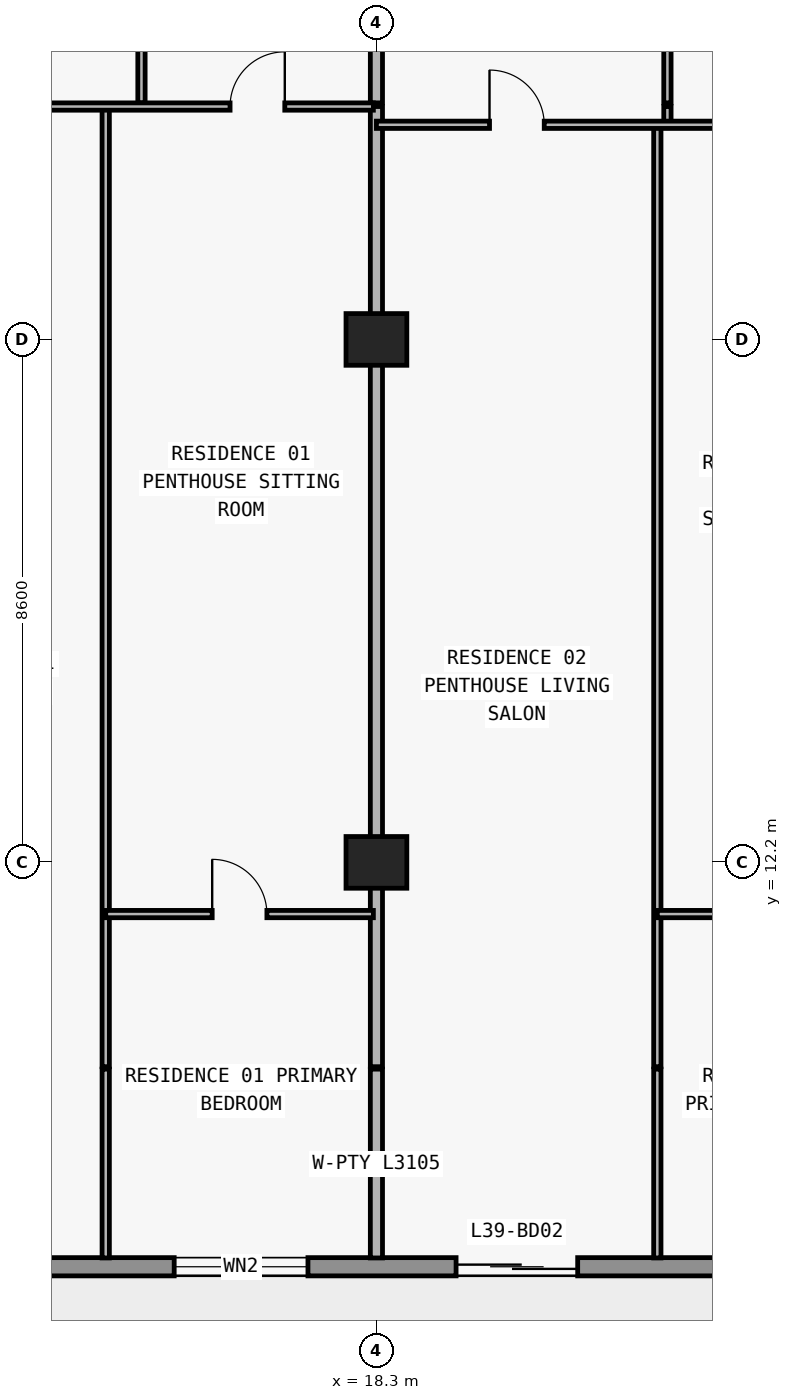
"""IFC4 building model, lengths in metres.
Left out: names, types, materials, properties, quantities, classifications, styles, units other than length and angle.
Written with IfcOpenShell. Run it as: python <this file> out.ifc"""

import sys

from ifc_helpers import new_model, si_unit, direction, frame, frame_2d, origin, origin_2d, place, context, subcontext, project, spatial, rectangle, extrude, element, fill, save


model = new_model("IFC4")
c1 = context("Model", 3, precision=1e-05, world=origin(), true_north=direction((0.0, 1.0)))
c2 = subcontext(c1, "Body", "Model", "MODEL_VIEW")
j1 = project(units=[si_unit("LENGTHUNIT", "METRE"), si_unit("PLANEANGLEUNIT", "RADIAN")], contexts=[c1])
p1 = place(None, origin())
s1 = spatial("IfcSite", under=j1, at=p1, CompositionType="ELEMENT")
p2 = place(p1, origin())
s2 = spatial("IfcBuilding", under=s1, at=p2, CompositionType="ELEMENT")
p3 = place(p2, frame((0.0, 0.0, 142.2)))
s3 = spatial("IfcBuildingStorey", under=s2, at=p3, CompositionType="ELEMENT", Elevation=142.2)
for number, where, z_axis, x_axis in (
    (1, (18.3, 12.2, 0.0), (0.0, 0.0, 1.0), (1.0, 0.0, 0.0)),
    (2, (18.3, 20.8, 0.0), (0.0, 0.0, 1.0), (1.0, 0.0, 0.0)),
):
    element("IfcColumn", number, at=place(p3, frame(where, z_axis=z_axis, x_axis=x_axis)), inside=s3, PredefinedType="COLUMN", context=c2, shape_type="SweptSolid", body=[
        extrude(rectangle(XDim=1.0, YDim=0.85, at=origin_2d()), origin(), (0.0, 0.0, 1.0), 3.05),
    ])
p4 = place(p3, frame((70.1, 5.55, 0.0), z_axis=(0.0, 0.0, 1.0), x_axis=(-1.0, 0.0, 0.0)))
e3 = element("IfcWall", 3, at=p4, inside=s3, PredefinedType="STANDARD", context=c2, shape_type="SweptSolid", body=[
    extrude(rectangle(XDim=62.4, YDim=0.3, at=frame_2d((31.2, 0.0))), origin(), (0.0, 0.0, 1.0), 3.05),
])
p5 = place(p4, frame((57.226, 0.0, 0.0)))
e4 = element("IfcOpeningElement", 4, at=p5, cuts=e3, PredefinedType="OPENING", context=c2, shape_type="SweptSolid", body=[
    extrude(rectangle(XDim=2.0, YDim=2.3, at=frame_2d((1.0, 1.15))), frame((0.0, 0.16, 0.0), z_axis=(0.0, -1.0, 0.0), x_axis=(1.0, 0.0, 0.0)), (0.0, 0.0, 1.0), 0.32),
])
p6 = place(p4, frame((52.926, 0.0, 0.85)))
e5 = element("IfcOpeningElement", 5, at=p6, cuts=e3, PredefinedType="OPENING", context=c2, shape_type="SweptSolid", body=[
    extrude(rectangle(XDim=2.2, YDim=1.55, at=frame_2d((1.1, 0.775))), frame((0.0, 0.16, 0.0), z_axis=(0.0, -1.0, 0.0), x_axis=(1.0, 0.0, 0.0)), (0.0, 0.0, 1.0), 0.32),
])
p7 = place(p4, frame((48.49, 0.0, 0.0)))
e6 = element("IfcOpeningElement", 6, at=p7, cuts=e3, PredefinedType="OPENING", context=c2, shape_type="SweptSolid", body=[
    extrude(rectangle(XDim=2.0, YDim=2.3, at=frame_2d((1.0, 1.15))), frame((0.0, 0.16, 0.0), z_axis=(0.0, -1.0, 0.0), x_axis=(1.0, 0.0, 0.0)), (0.0, 0.0, 1.0), 0.32),
])
p8 = place(p4, frame((44.39, 0.0, 0.85)))
e7 = element("IfcOpeningElement", 7, at=p8, cuts=e3, PredefinedType="OPENING", context=c2, shape_type="SweptSolid", body=[
    extrude(rectangle(XDim=1.8, YDim=1.55, at=frame_2d((0.9, 0.775))), frame((0.0, 0.16, 0.0), z_axis=(0.0, -1.0, 0.0), x_axis=(1.0, 0.0, 0.0)), (0.0, 0.0, 1.0), 0.32),
])
p9 = place(p4, frame((40.426, 0.0, 0.0)))
e8 = element("IfcOpeningElement", 8, at=p9, cuts=e3, PredefinedType="OPENING", context=c2, shape_type="SweptSolid", body=[
    extrude(rectangle(XDim=2.0, YDim=2.3, at=frame_2d((1.0, 1.15))), frame((0.0, 0.16, 0.0), z_axis=(0.0, -1.0, 0.0), x_axis=(1.0, 0.0, 0.0)), (0.0, 0.0, 1.0), 0.32),
])
p10 = place(p4, frame((36.126, 0.0, 0.85)))
e9 = element("IfcOpeningElement", 9, at=p10, cuts=e3, PredefinedType="OPENING", context=c2, shape_type="SweptSolid", body=[
    extrude(rectangle(XDim=2.2, YDim=1.55, at=frame_2d((1.1, 0.775))), frame((0.0, 0.16, 0.0), z_axis=(0.0, -1.0, 0.0), x_axis=(1.0, 0.0, 0.0)), (0.0, 0.0, 1.0), 0.32),
])
p11 = place(p4, frame((32.09, 0.0, 0.0)))
e10 = element("IfcOpeningElement", 10, at=p11, cuts=e3, PredefinedType="OPENING", context=c2, shape_type="SweptSolid", body=[
    extrude(rectangle(XDim=2.0, YDim=2.3, at=frame_2d((1.0, 1.15))), frame((0.0, 0.16, 0.0), z_axis=(0.0, -1.0, 0.0), x_axis=(1.0, 0.0, 0.0)), (0.0, 0.0, 1.0), 0.32),
])
p12 = place(p4, frame((28.21, 0.0, 0.65)))
e11 = element("IfcOpeningElement", 11, at=p12, cuts=e3, PredefinedType="OPENING", context=c2, shape_type="SweptSolid", body=[
    extrude(rectangle(XDim=2.6, YDim=1.85, at=frame_2d((1.3, 0.925))), frame((0.0, 0.16, 0.0), z_axis=(0.0, -1.0, 0.0), x_axis=(1.0, 0.0, 0.0)), (0.0, 0.0, 1.0), 0.32),
])
p13 = place(p4, frame((22.1, 0.0, 0.85)))
e12 = element("IfcOpeningElement", 12, at=p13, cuts=e3, PredefinedType="OPENING", context=c2, shape_type="SweptSolid", body=[
    extrude(rectangle(XDim=2.2, YDim=1.55, at=frame_2d((1.1, 0.775))), frame((0.0, 0.16, 0.0), z_axis=(0.0, -1.0, 0.0), x_axis=(1.0, 0.0, 0.0)), (0.0, 0.0, 1.0), 0.32),
])
p14 = place(p4, frame((16.09, 0.0, 0.0)))
e13 = element("IfcOpeningElement", 13, at=p14, cuts=e3, PredefinedType="OPENING", context=c2, shape_type="SweptSolid", body=[
    extrude(rectangle(XDim=2.0, YDim=2.3, at=frame_2d((1.0, 1.15))), frame((0.0, 0.16, 0.0), z_axis=(0.0, -1.0, 0.0), x_axis=(1.0, 0.0, 0.0)), (0.0, 0.0, 1.0), 0.32),
])
p15 = place(p4, frame((11.41, 0.0, 0.65)))
e14 = element("IfcOpeningElement", 14, at=p15, cuts=e3, PredefinedType="OPENING", context=c2, shape_type="SweptSolid", body=[
    extrude(rectangle(XDim=2.6, YDim=1.85, at=frame_2d((1.3, 0.925))), frame((0.0, 0.16, 0.0), z_axis=(0.0, -1.0, 0.0), x_axis=(1.0, 0.0, 0.0)), (0.0, 0.0, 1.0), 0.32),
])
p16 = place(p4, frame((5.3, 0.0, 0.85)))
e15 = element("IfcOpeningElement", 15, at=p16, cuts=e3, PredefinedType="OPENING", context=c2, shape_type="SweptSolid", body=[
    extrude(rectangle(XDim=2.2, YDim=1.55, at=frame_2d((1.1, 0.775))), frame((0.0, 0.16, 0.0), z_axis=(0.0, -1.0, 0.0), x_axis=(1.0, 0.0, 0.0)), (0.0, 0.0, 1.0), 0.32),
])
p17 = place(p3, frame((13.848, 5.695, 0.0), z_axis=(0.0, 0.0, 1.0), x_axis=(0.0, 1.0, 0.0)))
e16 = element("IfcWall", 16, at=p17, inside=s3, PredefinedType="PARTITIONING", context=c2, shape_type="SweptSolid", body=[
    extrude(rectangle(XDim=3.105, YDim=0.12, at=frame_2d((1.552, 0.0))), origin(), (0.0, 0.0, 1.0), 3.05),
])
p18 = place(p3, frame((13.848, 8.84, 0.0), z_axis=(0.0, 0.0, 1.0), x_axis=(0.0, 1.0, 0.0)))
e17 = element("IfcWall", 17, at=p18, inside=s3, PredefinedType="PARTITIONING", context=c2, shape_type="SweptSolid", body=[
    extrude(rectangle(XDim=15.79, YDim=0.12, at=frame_2d((7.895, 0.0))), origin(), (0.0, 0.0, 1.0), 3.05),
])
p19 = place(p3, frame((14.436, 24.69, 0.0), z_axis=(0.0, 0.0, 1.0), x_axis=(0.0, 1.0, 0.0)))
e18 = element("IfcWall", 18, at=p19, inside=s3, PredefinedType="PARTITIONING", context=c2, shape_type="SweptSolid", body=[
    extrude(rectangle(XDim=5.09, YDim=0.12, at=frame_2d((2.545, 0.0))), origin(), (0.0, 0.0, 1.0), 3.05),
])
p20 = place(p19, frame((2.095, 0.0, 0.0)))
e19 = element("IfcOpeningElement", 19, at=p20, cuts=e18, PredefinedType="OPENING", context=c2, shape_type="SweptSolid", body=[
    extrude(rectangle(XDim=0.9, YDim=2.15, at=frame_2d((0.45, 1.075))), frame((0.0, 0.07, 0.0), z_axis=(0.0, -1.0, 0.0), x_axis=(1.0, 0.0, 0.0)), (0.0, 0.0, 1.0), 0.14),
])
p21 = place(p3, frame((18.3, 5.695, 0.0), z_axis=(0.0, 0.0, 1.0), x_axis=(0.0, 1.0, 0.0)))
e20 = element("IfcWall", 20, at=p21, inside=s3, PredefinedType="PARTITIONING", context=c2, shape_type="SweptSolid", body=[
    extrude(rectangle(XDim=3.105, YDim=0.2, at=frame_2d((1.552, 0.0))), origin(), (0.0, 0.0, 1.0), 3.05),
])
p22 = place(p3, frame((18.3, 8.84, 0.0), z_axis=(0.0, 0.0, 1.0), x_axis=(0.0, 1.0, 0.0)))
e21 = element("IfcWall", 21, at=p22, inside=s3, PredefinedType="PARTITIONING", context=c2, shape_type="SweptSolid", body=[
    extrude(rectangle(XDim=15.79, YDim=0.2, at=frame_2d((7.895, 0.0))), origin(), (0.0, 0.0, 1.0), 2.174),
])
p23 = place(p3, frame((18.3, 24.69, 0.0), z_axis=(0.0, 0.0, 1.0), x_axis=(0.0, 1.0, 0.0)))
e22 = element("IfcWall", 22, at=p23, inside=s3, PredefinedType="PARTITIONING", context=c2, shape_type="SweptSolid", body=[
    extrude(rectangle(XDim=5.09, YDim=0.2, at=frame_2d((2.545, 0.0))), origin(), (0.0, 0.0, 1.0), 2.174),
])
p24 = place(p3, frame((22.92, 5.695, 0.0), z_axis=(0.0, 0.0, 1.0), x_axis=(0.0, 1.0, 0.0)))
e23 = element("IfcWall", 23, at=p24, inside=s3, PredefinedType="PARTITIONING", context=c2, shape_type="SweptSolid", body=[
    extrude(rectangle(XDim=3.105, YDim=0.12, at=frame_2d((1.552, 0.0))), origin(), (0.0, 0.0, 1.0), 3.05),
])
p25 = place(p3, frame((22.92, 8.84, 0.0), z_axis=(0.0, 0.0, 1.0), x_axis=(0.0, 1.0, 0.0)))
e24 = element("IfcWall", 24, at=p25, inside=s3, PredefinedType="PARTITIONING", context=c2, shape_type="SweptSolid", body=[
    extrude(rectangle(XDim=15.49, YDim=0.12, at=frame_2d((7.745, 0.0))), origin(), (0.0, 0.0, 1.0), 3.05),
])
p26 = place(p3, frame((23.086, 24.335, 0.0), z_axis=(0.0, 0.0, 1.0), x_axis=(0.0, 1.0, 0.0)))
e25 = element("IfcWall", 25, at=p26, inside=s3, PredefinedType="PARTITIONING", context=c2, shape_type="SweptSolid", body=[
    extrude(rectangle(XDim=0.295, YDim=0.12, at=frame_2d((0.147, 0.0))), origin(), (0.0, 0.0, 1.0), 3.05),
])
p27 = place(p3, frame((23.086, 24.69, 0.0), z_axis=(0.0, 0.0, 1.0), x_axis=(0.0, 1.0, 0.0)))
e26 = element("IfcWall", 26, at=p27, inside=s3, PredefinedType="PARTITIONING", context=c2, shape_type="SweptSolid", body=[
    extrude(rectangle(XDim=4.79, YDim=0.12, at=frame_2d((2.395, 0.0))), origin(), (0.0, 0.0, 1.0), 3.05),
])
p28 = place(p27, frame((1.945, 0.0, 0.0)))
e27 = element("IfcOpeningElement", 27, at=p28, cuts=e26, PredefinedType="OPENING", context=c2, shape_type="SweptSolid", body=[
    extrude(rectangle(XDim=0.9, YDim=2.15, at=frame_2d((0.45, 1.075))), frame((0.0, 0.07, 0.0), z_axis=(0.0, -1.0, 0.0), x_axis=(1.0, 0.0, 0.0)), (0.0, 0.0, 1.0), 0.14),
])
p29 = place(p3, frame((13.848, 11.35, 0.0), z_axis=(0.0, 0.0, 1.0), x_axis=(1.0, 0.0, 0.0)))
e28 = element("IfcWall", 28, at=p29, inside=s3, PredefinedType="PARTITIONING", context=c2, shape_type="SweptSolid", body=[
    extrude(rectangle(XDim=4.402, YDim=0.12, at=frame_2d((2.201, 0.0))), origin(), (0.0, 0.0, 1.0), 3.05),
])
p30 = place(p29, frame((1.751, 0.0, 0.0)))
e29 = element("IfcOpeningElement", 29, at=p30, cuts=e28, PredefinedType="OPENING", context=c2, shape_type="SweptSolid", body=[
    extrude(rectangle(XDim=0.9, YDim=2.15, at=frame_2d((0.45, 1.075))), frame((0.0, 0.07, 0.0), z_axis=(0.0, -1.0, 0.0), x_axis=(1.0, 0.0, 0.0)), (0.0, 0.0, 1.0), 0.14),
])
p31 = place(p3, frame((22.92, 11.35, 0.0), z_axis=(0.0, 0.0, 1.0), x_axis=(1.0, 0.0, 0.0)))
e30 = element("IfcWall", 30, at=p31, inside=s3, PredefinedType="PARTITIONING", context=c2, shape_type="SweptSolid", body=[
    extrude(rectangle(XDim=3.78, YDim=0.12, at=frame_2d((1.89, 0.0))), origin(), (0.0, 0.0, 1.0), 3.05),
])
p32 = place(p31, frame((1.44, 0.0, 0.0)))
e31 = element("IfcOpeningElement", 31, at=p32, cuts=e30, PredefinedType="OPENING", context=c2, shape_type="SweptSolid", body=[
    extrude(rectangle(XDim=0.9, YDim=2.15, at=frame_2d((0.45, 1.075))), frame((0.0, 0.07, 0.0), z_axis=(0.0, -1.0, 0.0), x_axis=(1.0, 0.0, 0.0)), (0.0, 0.0, 1.0), 0.14),
])
p33 = place(p3, frame((18.3, 24.33, 0.0), z_axis=(0.0, 0.0, 1.0), x_axis=(1.0, 0.0, 0.0)))
e32 = element("IfcWall", 32, at=p33, inside=s3, PredefinedType="PARTITIONING", context=c2, shape_type="SweptSolid", body=[
    extrude(rectangle(XDim=8.18, YDim=0.12, at=frame_2d((4.09, 0.0))), origin(), (0.0, 0.0, 1.0), 3.05),
])
p34 = place(p33, frame((1.86, 0.0, 0.0)))
e33 = element("IfcOpeningElement", 33, at=p34, cuts=e32, PredefinedType="OPENING", context=c2, shape_type="SweptSolid", body=[
    extrude(rectangle(XDim=0.9, YDim=2.15, at=frame_2d((0.45, 1.075))), frame((0.0, 0.07, 0.0), z_axis=(0.0, -1.0, 0.0), x_axis=(1.0, 0.0, 0.0)), (0.0, 0.0, 1.0), 0.14),
])
p35 = place(p33, frame((6.033, 0.0, 0.0)))
e34 = element("IfcOpeningElement", 34, at=p35, cuts=e32, PredefinedType="OPENING", context=c2, shape_type="SweptSolid", body=[
    extrude(rectangle(XDim=0.9, YDim=2.15, at=frame_2d((0.45, 1.075))), frame((0.0, 0.07, 0.0), z_axis=(0.0, -1.0, 0.0), x_axis=(1.0, 0.0, 0.0)), (0.0, 0.0, 1.0), 0.14),
])
p36 = place(p3, frame((9.9, 24.63, 0.0), z_axis=(0.0, 0.0, 1.0), x_axis=(1.0, 0.0, 0.0)))
e35 = element("IfcWall", 35, at=p36, inside=s3, PredefinedType="PARTITIONING", context=c2, shape_type="SweptSolid", body=[
    extrude(rectangle(XDim=8.35, YDim=0.12, at=frame_2d((4.175, 0.0))), origin(), (0.0, 0.0, 1.0), 3.05),
])
p37 = place(p36, frame((1.524, 0.0, 0.0)))
e36 = element("IfcOpeningElement", 36, at=p37, cuts=e35, PredefinedType="OPENING", context=c2, shape_type="SweptSolid", body=[
    extrude(rectangle(XDim=0.9, YDim=2.15, at=frame_2d((0.45, 1.075))), frame((0.0, 0.07, 0.0), z_axis=(0.0, -1.0, 0.0), x_axis=(1.0, 0.0, 0.0)), (0.0, 0.0, 1.0), 0.14),
])
p38 = place(p36, frame((5.993, 0.0, 0.0)))
e37 = element("IfcOpeningElement", 37, at=p38, cuts=e35, PredefinedType="OPENING", context=c2, shape_type="SweptSolid", body=[
    extrude(rectangle(XDim=0.9, YDim=2.15, at=frame_2d((0.45, 1.075))), frame((0.0, 0.07, 0.0), z_axis=(0.0, -1.0, 0.0), x_axis=(1.0, 0.0, 0.0)), (0.0, 0.0, 1.0), 0.14),
])
p39 = place(p6, origin())
e38 = element("IfcWindow", 38, at=p39, inside=s3, PartitioningType="SINGLE_PANEL", PredefinedType="WINDOW", context=c2, shape_type="SweptSolid", body=[
    extrude(rectangle(XDim=2.2, YDim=1.55, at=frame_2d((1.1, 0.775))), frame((0.0, 0.03, 0.0), z_axis=(0.0, -1.0, 0.0), x_axis=(1.0, 0.0, 0.0)), (0.0, 0.0, 1.0), 0.06),
])
fill(e5, e38)
p40 = place(p7, origin())
e39 = element("IfcDoor", 39, at=p40, inside=s3, OperationType="DOUBLE_DOOR_SLIDING", PredefinedType="DOOR", context=c2, shape_type="SweptSolid", body=[
    extrude(rectangle(XDim=2.0, YDim=2.3, at=frame_2d((1.0, 1.15))), frame((0.0, 0.025, 0.0), z_axis=(0.0, -1.0, 0.0), x_axis=(1.0, 0.0, 0.0)), (0.0, 0.0, 1.0), 0.05),
])
fill(e6, e39)
p41 = place(p38, origin())
e40 = element("IfcDoor", 40, at=p41, inside=s3, OperationType="SINGLE_SWING_RIGHT", PredefinedType="DOOR", context=c2, shape_type="SweptSolid", body=[
    extrude(rectangle(XDim=0.9, YDim=2.15, at=frame_2d((0.45, 1.075))), frame((0.0, 0.025, 0.0), z_axis=(0.0, -1.0, 0.0), x_axis=(1.0, 0.0, 0.0)), (0.0, 0.0, 1.0), 0.05),
])
fill(e37, e40)
p42 = place(p30, origin())
e41 = element("IfcDoor", 41, at=p42, inside=s3, OperationType="SINGLE_SWING_LEFT", PredefinedType="DOOR", context=c2, shape_type="SweptSolid", body=[
    extrude(rectangle(XDim=0.9, YDim=2.15, at=frame_2d((0.45, 1.075))), frame((0.0, 0.025, 0.0), z_axis=(0.0, -1.0, 0.0), x_axis=(1.0, 0.0, 0.0)), (0.0, 0.0, 1.0), 0.05),
])
fill(e29, e41)
p43 = place(p34, origin())
e42 = element("IfcDoor", 42, at=p43, inside=s3, OperationType="SINGLE_SWING_LEFT", PredefinedType="DOOR", context=c2, shape_type="SweptSolid", body=[
    extrude(rectangle(XDim=0.9, YDim=2.15, at=frame_2d((0.45, 1.075))), frame((0.0, 0.025, 0.0), z_axis=(0.0, -1.0, 0.0), x_axis=(1.0, 0.0, 0.0)), (0.0, 0.0, 1.0), 0.05),
])
fill(e33, e42)
save(model, sys.argv[1])
